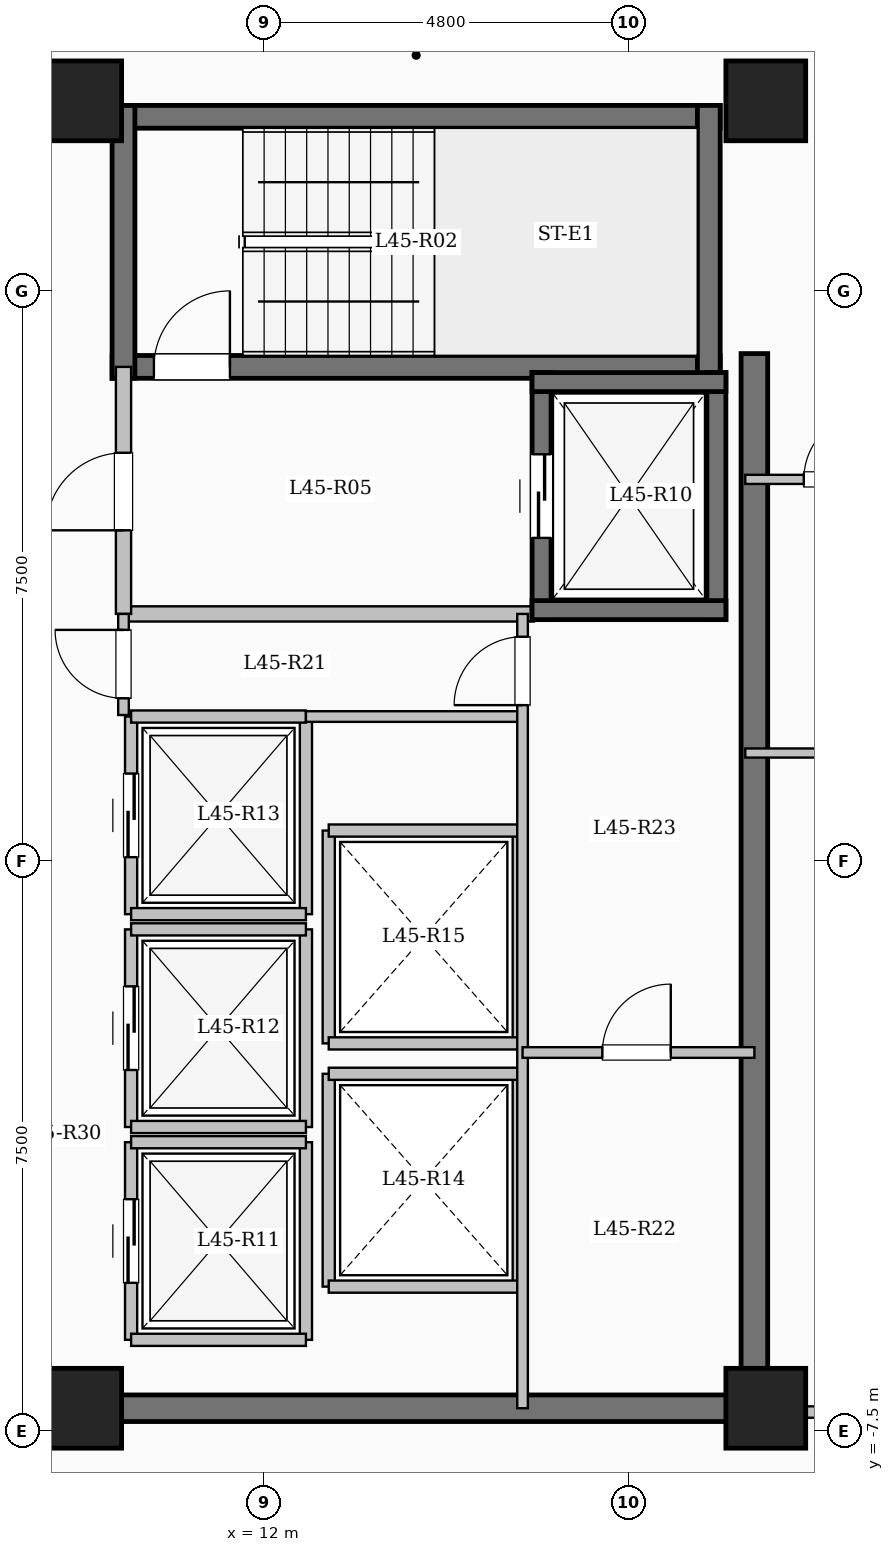
"""IFC4 building model, lengths in metres.
Left out: names, types, materials, properties, quantities, classifications, styles, units other than length and angle.
Written with IfcOpenShell. Run it as: python <this file> out.ifc"""

import sys

from ifc_helpers import new_model, si_unit, direction, frame, frame_2d, origin, origin_2d, place, context, subcontext, project, spatial, rectangle, extrude, element, fill, save


model = new_model("IFC4")
c1 = context("Model", 3, precision=1e-05, world=origin(), true_north=direction((0.0, 1.0)))
c2 = subcontext(c1, "Body", "Model", "MODEL_VIEW")
j1 = project(units=[si_unit("LENGTHUNIT", "METRE"), si_unit("PLANEANGLEUNIT", "RADIAN")], contexts=[c1])
p1 = place(None, origin())
s1 = spatial("IfcSite", under=j1, at=p1, CompositionType="ELEMENT")
p2 = place(p1, origin())
s2 = spatial("IfcBuilding", under=s1, at=p2, CompositionType="ELEMENT")
p3 = place(p2, frame((0.0, 0.0, 166.1)))
s3 = spatial("IfcBuildingStorey", under=s2, at=p3, CompositionType="ELEMENT", Elevation=166.1)
for number, where, z_axis, x_axis in (
    (1, (9.6, -7.2, 0.0), (0.0, 0.0, 1.0), (1.0, 0.0, 0.0)),
    (2, (9.6, 10.0, 0.0), (0.0, 0.0, 1.0), (1.0, 0.0, 0.0)),
    (3, (18.6, -7.2, 0.0), (0.0, 0.0, 1.0), (1.0, 0.0, 0.0)),
    (4, (18.6, 10.0, 0.0), (0.0, 0.0, 1.0), (1.0, 0.0, 0.0)),
):
    element("IfcColumn", number, at=place(p3, frame(where, z_axis=z_axis, x_axis=x_axis)), inside=s3, PredefinedType="COLUMN", context=c2, shape_type="SweptSolid", body=[
        extrude(rectangle(XDim=1.05, YDim=1.05, at=origin_2d()), origin(), (0.0, 0.0, 1.0), 3.35),
    ])
p4 = place(p3, frame((10.0, 9.79, 0.0), z_axis=(0.0, 0.0, 1.0), x_axis=(1.0, 0.0, 0.0)))
e5 = element("IfcWall", 5, at=p4, inside=s3, PredefinedType="SHEAR", context=c2, shape_type="SweptSolid", body=[
    extrude(rectangle(XDim=8.0, YDim=0.3, at=frame_2d((4.0, 0.0))), origin(), (0.0, 0.0, 1.0), 3.35),
])
p5 = place(p3, frame((10.0, 6.5, 0.0), z_axis=(0.0, 0.0, 1.0), x_axis=(1.0, 0.0, 0.0)))
e6 = element("IfcWall", 6, at=p5, inside=s3, PredefinedType="SHEAR", context=c2, shape_type="SweptSolid", body=[
    extrude(rectangle(XDim=8.0, YDim=0.3, at=frame_2d((4.0, 0.0))), origin(), (0.0, 0.0, 1.0), 3.35),
])
p6 = place(p5, frame((0.55, 0.0, 0.0)))
e7 = element("IfcOpeningElement", 7, at=p6, cuts=e6, PredefinedType="OPENING", context=c2, shape_type="SweptSolid", body=[
    extrude(rectangle(XDim=1.0, YDim=2.15, at=frame_2d((0.5, 1.075))), frame((0.0, 0.16, 0.0), z_axis=(0.0, -1.0, 0.0), x_axis=(1.0, 0.0, 0.0)), (0.0, 0.0, 1.0), 0.32),
])
for number, where, z_axis, x_axis in (
    (8, (10.15, 6.35, 0.0), (0.0, 0.0, 1.0), (0.0, 1.0, 0.0)),
    (9, (17.85, 6.35, 0.0), (0.0, 0.0, 1.0), (0.0, 1.0, 0.0)),
):
    element("IfcWall", number, at=place(p3, frame(where, z_axis=z_axis, x_axis=x_axis)), inside=s3, PredefinedType="SHEAR", context=c2, shape_type="SweptSolid", body=[
        extrude(rectangle(XDim=3.59, YDim=0.3, at=frame_2d((1.795, 0.0))), origin(), (0.0, 0.0, 1.0), 3.35),
    ])
p7 = place(p3, frame((10.15, 3.25, 0.0), z_axis=(0.0, 0.0, 1.0), x_axis=(1.0, 0.0, 0.0)))
e10 = element("IfcWall", 10, at=p7, inside=s3, PredefinedType="SOLIDWALL", context=c2, shape_type="SweptSolid", body=[
    extrude(rectangle(XDim=5.4, YDim=0.2, at=frame_2d((2.7, 0.0))), origin(), (0.0, 0.0, 1.0), 3.1),
])
p8 = place(p3, frame((10.15, 3.25, 0.0), z_axis=(0.0, 0.0, 1.0), x_axis=(0.0, 1.0, 0.0)))
e11 = element("IfcWall", 11, at=p8, inside=s3, PredefinedType="SOLIDWALL", context=c2, shape_type="SweptSolid", body=[
    extrude(rectangle(XDim=3.25, YDim=0.2, at=frame_2d((1.625, 0.0))), origin(), (0.0, 0.0, 1.0), 3.1),
])
p9 = place(p8, frame((1.1, 0.0, 0.0)))
e12 = element("IfcOpeningElement", 12, at=p9, cuts=e11, PredefinedType="OPENING", context=c2, shape_type="SweptSolid", body=[
    extrude(rectangle(XDim=1.02, YDim=2.15, at=frame_2d((0.51, 1.075))), frame((0.0, 0.11, 0.0), z_axis=(0.0, -1.0, 0.0), x_axis=(1.0, 0.0, 0.0)), (0.0, 0.0, 1.0), 0.22),
])
p10 = place(p3, frame((15.65, 3.175, 0.0), z_axis=(0.0, 0.0, 1.0), x_axis=(0.0, 1.0, 0.0)))
e13 = element("IfcWall", 13, at=p10, inside=s3, PredefinedType="SHEAR", context=c2, shape_type="SweptSolid", body=[
    extrude(rectangle(XDim=3.25, YDim=0.25, at=frame_2d((1.625, 0.0))), origin(), (0.0, 0.0, 1.0), 3.35),
])
p11 = place(p10, frame((1.075, 0.0, 0.0)))
e14 = element("IfcOpeningElement", 14, at=p11, cuts=e13, PredefinedType="OPENING", context=c2, shape_type="SweptSolid", body=[
    extrude(rectangle(XDim=1.1, YDim=2.15, at=frame_2d((0.55, 1.075))), frame((0.0, 0.135, 0.0), z_axis=(0.0, -1.0, 0.0), x_axis=(1.0, 0.0, 0.0)), (0.0, 0.0, 1.0), 0.27),
])
p12 = place(p3, frame((17.95, 3.175, 0.0), z_axis=(0.0, 0.0, 1.0), x_axis=(0.0, 1.0, 0.0)))
e15 = element("IfcWall", 15, at=p12, inside=s3, PredefinedType="SHEAR", context=c2, shape_type="SweptSolid", body=[
    extrude(rectangle(XDim=3.25, YDim=0.25, at=frame_2d((1.625, 0.0))), origin(), (0.0, 0.0, 1.0), 3.35),
])
for number, where, z_axis, x_axis in (
    (16, (15.525, 3.3, 0.0), (0.0, 0.0, 1.0), (1.0, 0.0, 0.0)),
    (17, (15.525, 6.3, 0.0), (0.0, 0.0, 1.0), (1.0, 0.0, 0.0)),
):
    element("IfcWall", number, at=place(p3, frame(where, z_axis=z_axis, x_axis=x_axis)), inside=s3, PredefinedType="SHEAR", context=c2, shape_type="SweptSolid", body=[
        extrude(rectangle(XDim=2.55, YDim=0.25, at=frame_2d((1.275, 0.0))), origin(), (0.0, 0.0, 1.0), 3.35),
    ])
p13 = place(p3, frame((10.25, -6.3, 0.0), z_axis=(0.0, 0.0, 1.0), x_axis=(0.0, 1.0, 0.0)))
e18 = element("IfcWall", 18, at=p13, inside=s3, PredefinedType="SOLIDWALL", context=c2, shape_type="SweptSolid", body=[
    extrude(rectangle(XDim=2.6, YDim=0.16, at=frame_2d((1.3, 0.0))), origin(), (0.0, 0.0, 1.0), 3.1),
])
p14 = place(p13, frame((0.75, 0.0, 0.0)))
e19 = element("IfcOpeningElement", 19, at=p14, cuts=e18, PredefinedType="OPENING", context=c2, shape_type="SweptSolid", body=[
    extrude(rectangle(XDim=1.1, YDim=2.15, at=frame_2d((0.55, 1.075))), frame((0.0, 0.09, 0.0), z_axis=(0.0, -1.0, 0.0), x_axis=(1.0, 0.0, 0.0)), (0.0, 0.0, 1.0), 0.18),
])
p15 = place(p3, frame((12.55, -6.3, 0.0), z_axis=(0.0, 0.0, 1.0), x_axis=(0.0, 1.0, 0.0)))
e20 = element("IfcWall", 20, at=p15, inside=s3, PredefinedType="SOLIDWALL", context=c2, shape_type="SweptSolid", body=[
    extrude(rectangle(XDim=2.6, YDim=0.16, at=frame_2d((1.3, 0.0))), origin(), (0.0, 0.0, 1.0), 3.1),
])
for number, where, z_axis, x_axis in (
    (21, (10.25, -6.3, 0.0), (0.0, 0.0, 1.0), (1.0, 0.0, 0.0)),
    (22, (10.25, -3.7, 0.0), (0.0, 0.0, 1.0), (1.0, 0.0, 0.0)),
):
    element("IfcWall", number, at=place(p3, frame(where, z_axis=z_axis, x_axis=x_axis)), inside=s3, PredefinedType="SOLIDWALL", context=c2, shape_type="SweptSolid", body=[
        extrude(rectangle(XDim=2.3, YDim=0.16, at=frame_2d((1.15, 0.0))), origin(), (0.0, 0.0, 1.0), 3.1),
    ])
p16 = place(p3, frame((10.25, -3.5, 0.0), z_axis=(0.0, 0.0, 1.0), x_axis=(0.0, 1.0, 0.0)))
e23 = element("IfcWall", 23, at=p16, inside=s3, PredefinedType="SOLIDWALL", context=c2, shape_type="SweptSolid", body=[
    extrude(rectangle(XDim=2.6, YDim=0.16, at=frame_2d((1.3, 0.0))), origin(), (0.0, 0.0, 1.0), 3.1),
])
p17 = place(p16, frame((0.75, 0.0, 0.0)))
e24 = element("IfcOpeningElement", 24, at=p17, cuts=e23, PredefinedType="OPENING", context=c2, shape_type="SweptSolid", body=[
    extrude(rectangle(XDim=1.1, YDim=2.15, at=frame_2d((0.55, 1.075))), frame((0.0, 0.09, 0.0), z_axis=(0.0, -1.0, 0.0), x_axis=(1.0, 0.0, 0.0)), (0.0, 0.0, 1.0), 0.18),
])
p18 = place(p3, frame((12.55, -3.5, 0.0), z_axis=(0.0, 0.0, 1.0), x_axis=(0.0, 1.0, 0.0)))
e25 = element("IfcWall", 25, at=p18, inside=s3, PredefinedType="SOLIDWALL", context=c2, shape_type="SweptSolid", body=[
    extrude(rectangle(XDim=2.6, YDim=0.16, at=frame_2d((1.3, 0.0))), origin(), (0.0, 0.0, 1.0), 3.1),
])
for number, where, z_axis, x_axis in (
    (26, (10.25, -3.5, 0.0), (0.0, 0.0, 1.0), (1.0, 0.0, 0.0)),
    (27, (10.25, -0.9, 0.0), (0.0, 0.0, 1.0), (1.0, 0.0, 0.0)),
):
    element("IfcWall", number, at=place(p3, frame(where, z_axis=z_axis, x_axis=x_axis)), inside=s3, PredefinedType="SOLIDWALL", context=c2, shape_type="SweptSolid", body=[
        extrude(rectangle(XDim=2.3, YDim=0.16, at=frame_2d((1.15, 0.0))), origin(), (0.0, 0.0, 1.0), 3.1),
    ])
p19 = place(p3, frame((10.25, -0.7, 0.0), z_axis=(0.0, 0.0, 1.0), x_axis=(0.0, 1.0, 0.0)))
e28 = element("IfcWall", 28, at=p19, inside=s3, PredefinedType="SOLIDWALL", context=c2, shape_type="SweptSolid", body=[
    extrude(rectangle(XDim=2.6, YDim=0.16, at=frame_2d((1.3, 0.0))), origin(), (0.0, 0.0, 1.0), 3.1),
])
p20 = place(p19, frame((0.75, 0.0, 0.0)))
e29 = element("IfcOpeningElement", 29, at=p20, cuts=e28, PredefinedType="OPENING", context=c2, shape_type="SweptSolid", body=[
    extrude(rectangle(XDim=1.1, YDim=2.15, at=frame_2d((0.55, 1.075))), frame((0.0, 0.09, 0.0), z_axis=(0.0, -1.0, 0.0), x_axis=(1.0, 0.0, 0.0)), (0.0, 0.0, 1.0), 0.18),
])
p21 = place(p3, frame((12.55, -0.7, 0.0), z_axis=(0.0, 0.0, 1.0), x_axis=(0.0, 1.0, 0.0)))
e30 = element("IfcWall", 30, at=p21, inside=s3, PredefinedType="SOLIDWALL", context=c2, shape_type="SweptSolid", body=[
    extrude(rectangle(XDim=2.6, YDim=0.16, at=frame_2d((1.3, 0.0))), origin(), (0.0, 0.0, 1.0), 3.1),
])
for number, where, z_axis, x_axis in (
    (31, (10.25, -0.7, 0.0), (0.0, 0.0, 1.0), (1.0, 0.0, 0.0)),
    (32, (10.25, 1.9, 0.0), (0.0, 0.0, 1.0), (1.0, 0.0, 0.0)),
):
    element("IfcWall", number, at=place(p3, frame(where, z_axis=z_axis, x_axis=x_axis)), inside=s3, PredefinedType="SOLIDWALL", context=c2, shape_type="SweptSolid", body=[
        extrude(rectangle(XDim=2.3, YDim=0.16, at=frame_2d((1.15, 0.0))), origin(), (0.0, 0.0, 1.0), 3.1),
    ])
for number, where, z_axis, x_axis in (
    (33, (12.85, -5.6, 0.0), (0.0, 0.0, 1.0), (0.0, 1.0, 0.0)),
    (34, (15.35, -5.6, 0.0), (0.0, 0.0, 1.0), (0.0, 1.0, 0.0)),
):
    element("IfcWall", number, at=place(p3, frame(where, z_axis=z_axis, x_axis=x_axis)), inside=s3, PredefinedType="SOLIDWALL", context=c2, shape_type="SweptSolid", body=[
        extrude(rectangle(XDim=2.8, YDim=0.16, at=frame_2d((1.4, 0.0))), origin(), (0.0, 0.0, 1.0), 3.1),
    ])
for number, where, z_axis, x_axis in (
    (35, (12.85, -5.6, 0.0), (0.0, 0.0, 1.0), (1.0, 0.0, 0.0)),
    (36, (12.85, -2.8, 0.0), (0.0, 0.0, 1.0), (1.0, 0.0, 0.0)),
):
    element("IfcWall", number, at=place(p3, frame(where, z_axis=z_axis, x_axis=x_axis)), inside=s3, PredefinedType="SOLIDWALL", context=c2, shape_type="SweptSolid", body=[
        extrude(rectangle(XDim=2.5, YDim=0.16, at=frame_2d((1.25, 0.0))), origin(), (0.0, 0.0, 1.0), 3.1),
    ])
for number, where, z_axis, x_axis in (
    (37, (12.85, -2.4, 0.0), (0.0, 0.0, 1.0), (0.0, 1.0, 0.0)),
    (38, (15.35, -2.4, 0.0), (0.0, 0.0, 1.0), (0.0, 1.0, 0.0)),
):
    element("IfcWall", number, at=place(p3, frame(where, z_axis=z_axis, x_axis=x_axis)), inside=s3, PredefinedType="SOLIDWALL", context=c2, shape_type="SweptSolid", body=[
        extrude(rectangle(XDim=2.8, YDim=0.16, at=frame_2d((1.4, 0.0))), origin(), (0.0, 0.0, 1.0), 3.1),
    ])
for number, where, z_axis, x_axis in (
    (39, (12.85, -2.4, 0.0), (0.0, 0.0, 1.0), (1.0, 0.0, 0.0)),
    (40, (12.85, 0.4, 0.0), (0.0, 0.0, 1.0), (1.0, 0.0, 0.0)),
):
    element("IfcWall", number, at=place(p3, frame(where, z_axis=z_axis, x_axis=x_axis)), inside=s3, PredefinedType="SOLIDWALL", context=c2, shape_type="SweptSolid", body=[
        extrude(rectangle(XDim=2.5, YDim=0.16, at=frame_2d((1.25, 0.0))), origin(), (0.0, 0.0, 1.0), 3.1),
    ])
p22 = place(p3, frame((18.45, -7.375, 0.0), z_axis=(0.0, 0.0, 1.0), x_axis=(0.0, 1.0, 0.0)))
e41 = element("IfcWall", 41, at=p22, inside=s3, PredefinedType="SHEAR", context=c2, shape_type="SweptSolid", body=[
    extrude(rectangle(XDim=14.05, YDim=0.35, at=frame_2d((7.025, 0.0))), origin(), (0.0, 0.0, 1.0), 3.35),
])
p23 = place(p3, frame((10.075, -7.2, 0.0), z_axis=(0.0, 0.0, 1.0), x_axis=(1.0, 0.0, 0.0)))
e42 = element("IfcWall", 42, at=p23, inside=s3, PredefinedType="SHEAR", context=c2, shape_type="SweptSolid", body=[
    extrude(rectangle(XDim=8.55, YDim=0.35, at=frame_2d((4.275, 0.0))), origin(), (0.0, 0.0, 1.0), 3.35),
])
p24 = place(p3, frame((12.55, 1.9, 0.0), z_axis=(0.0, 0.0, 1.0), x_axis=(1.0, 0.0, 0.0)))
e43 = element("IfcWall", 43, at=p24, inside=s3, PredefinedType="PARTITIONING", context=c2, shape_type="SweptSolid", body=[
    extrude(rectangle(XDim=2.85, YDim=0.14, at=frame_2d((1.425, 0.0))), origin(), (0.0, 0.0, 1.0), 3.1),
])
p25 = place(p3, frame((10.15, 1.92, 0.0), z_axis=(0.0, 0.0, 1.0), x_axis=(0.0, 1.0, 0.0)))
e44 = element("IfcWall", 44, at=p25, inside=s3, PredefinedType="PARTITIONING", context=c2, shape_type="SweptSolid", body=[
    extrude(rectangle(XDim=1.33, YDim=0.14, at=frame_2d((0.665, 0.0))), origin(), (0.0, 0.0, 1.0), 3.1),
])
p26 = place(p25, frame((0.22, 0.0, 0.0)))
e45 = element("IfcOpeningElement", 45, at=p26, cuts=e44, PredefinedType="OPENING", context=c2, shape_type="SweptSolid", body=[
    extrude(rectangle(XDim=0.9, YDim=2.08, at=frame_2d((0.45, 1.04))), frame((0.0, 0.08, 0.0), z_axis=(0.0, -1.0, 0.0), x_axis=(1.0, 0.0, 0.0)), (0.0, 0.0, 1.0), 0.16),
])
p27 = place(p3, frame((15.4, -7.2, 0.0), z_axis=(0.0, 0.0, 1.0), x_axis=(0.0, 1.0, 0.0)))
e46 = element("IfcWall", 46, at=p27, inside=s3, PredefinedType="PARTITIONING", context=c2, shape_type="SweptSolid", body=[
    extrude(rectangle(XDim=10.45, YDim=0.14, at=frame_2d((5.225, 0.0))), origin(), (0.0, 0.0, 1.0), 3.1),
])
p28 = place(p27, frame((9.25, 0.0, 0.0)))
e47 = element("IfcOpeningElement", 47, at=p28, cuts=e46, PredefinedType="OPENING", context=c2, shape_type="SweptSolid", body=[
    extrude(rectangle(XDim=0.9, YDim=2.08, at=frame_2d((0.45, 1.04))), frame((0.0, 0.08, 0.0), z_axis=(0.0, -1.0, 0.0), x_axis=(1.0, 0.0, 0.0)), (0.0, 0.0, 1.0), 0.16),
])
p29 = place(p3, frame((15.4, -2.52, 0.0), z_axis=(0.0, 0.0, 1.0), x_axis=(1.0, 0.0, 0.0)))
e48 = element("IfcWall", 48, at=p29, inside=s3, PredefinedType="PARTITIONING", context=c2, shape_type="SweptSolid", body=[
    extrude(rectangle(XDim=3.05, YDim=0.14, at=frame_2d((1.525, 0.0))), origin(), (0.0, 0.0, 1.0), 3.1),
])
p30 = place(p29, frame((1.05, 0.0, 0.0)))
e49 = element("IfcOpeningElement", 49, at=p30, cuts=e48, PredefinedType="OPENING", context=c2, shape_type="SweptSolid", body=[
    extrude(rectangle(XDim=0.9, YDim=2.08, at=frame_2d((0.45, 1.04))), frame((0.0, 0.08, 0.0), z_axis=(0.0, -1.0, 0.0), x_axis=(1.0, 0.0, 0.0)), (0.0, 0.0, 1.0), 0.16),
])
p31 = place(p3, frame((18.45, -7.25, 0.0), z_axis=(0.0, 0.0, 1.0), x_axis=(1.0, 0.0, 0.0)))
e50 = element("IfcWall", 50, at=p31, inside=s3, PredefinedType="PARTITIONING", context=c2, shape_type="SweptSolid", body=[
    extrude(rectangle(XDim=6.63, YDim=0.15, at=frame_2d((3.315, 0.0))), origin(), (0.0, 0.0, 1.0), 3.1),
])
p32 = place(p31, frame((1.95, 0.0, 0.0)))
e51 = element("IfcOpeningElement", 51, at=p32, cuts=e50, PredefinedType="OPENING", context=c2, shape_type="SweptSolid", body=[
    extrude(rectangle(XDim=0.96, YDim=2.15, at=frame_2d((0.48, 1.075))), frame((0.0, 0.085, 0.0), z_axis=(0.0, -1.0, 0.0), x_axis=(1.0, 0.0, 0.0)), (0.0, 0.0, 1.0), 0.17),
])
p33 = place(p3, frame((18.33, 1.42, 0.0), z_axis=(0.0, 0.0, 1.0), x_axis=(1.0, 0.0, 0.0)))
e52 = element("IfcWall", 52, at=p33, inside=s3, PredefinedType="PARTITIONING", context=c2, shape_type="SweptSolid", body=[
    extrude(rectangle(XDim=6.87, YDim=0.12, at=frame_2d((3.435, 0.0))), origin(), (0.0, 0.0, 1.0), 3.1),
])
p34 = place(p33, frame((1.413, 0.0, 0.0)))
e53 = element("IfcOpeningElement", 53, at=p34, cuts=e52, PredefinedType="OPENING", context=c2, shape_type="SweptSolid", body=[
    extrude(rectangle(XDim=0.88, YDim=2.1, at=frame_2d((0.44, 1.05))), frame((0.0, 0.07, 0.0), z_axis=(0.0, -1.0, 0.0), x_axis=(1.0, 0.0, 0.0)), (0.0, 0.0, 1.0), 0.14),
])
p35 = place(p33, frame((4.678, 0.0, 0.0)))
e54 = element("IfcOpeningElement", 54, at=p35, cuts=e52, PredefinedType="OPENING", context=c2, shape_type="SweptSolid", body=[
    extrude(rectangle(XDim=0.88, YDim=2.1, at=frame_2d((0.44, 1.05))), frame((0.0, 0.07, 0.0), z_axis=(0.0, -1.0, 0.0), x_axis=(1.0, 0.0, 0.0)), (0.0, 0.0, 1.0), 0.14),
])
p36 = place(p3, frame((18.33, 5.02, 0.0), z_axis=(0.0, 0.0, 1.0), x_axis=(1.0, 0.0, 0.0)))
e55 = element("IfcWall", 55, at=p36, inside=s3, PredefinedType="PARTITIONING", context=c2, shape_type="SweptSolid", body=[
    extrude(rectangle(XDim=6.87, YDim=0.12, at=frame_2d((3.435, 0.0))), origin(), (0.0, 0.0, 1.0), 3.1),
])
p37 = place(p36, frame((0.77, 0.0, 0.0)))
e56 = element("IfcOpeningElement", 56, at=p37, cuts=e55, PredefinedType="OPENING", context=c2, shape_type="SweptSolid", body=[
    extrude(rectangle(XDim=0.88, YDim=2.1, at=frame_2d((0.44, 1.05))), frame((0.0, 0.07, 0.0), z_axis=(0.0, -1.0, 0.0), x_axis=(1.0, 0.0, 0.0)), (0.0, 0.0, 1.0), 0.14),
])
p38 = place(p6, origin())
e57 = element("IfcDoor", 57, at=p38, inside=s3, OperationType="SINGLE_SWING_RIGHT", PredefinedType="DOOR", context=c2, shape_type="SweptSolid", body=[
    extrude(rectangle(XDim=1.0, YDim=2.15, at=frame_2d((0.5, 1.075))), frame((0.0, 0.025, 0.0), z_axis=(0.0, -1.0, 0.0), x_axis=(1.0, 0.0, 0.0)), (0.0, 0.0, 1.0), 0.05),
])
fill(e7, e57)
p39 = place(p9, origin())
e58 = element("IfcDoor", 58, at=p39, inside=s3, OperationType="SINGLE_SWING_LEFT", PredefinedType="DOOR", context=c2, shape_type="SweptSolid", body=[
    extrude(rectangle(XDim=1.02, YDim=2.15, at=frame_2d((0.51, 1.075))), frame((0.0, 0.025, 0.0), z_axis=(0.0, -1.0, 0.0), x_axis=(1.0, 0.0, 0.0)), (0.0, 0.0, 1.0), 0.05),
])
fill(e12, e58)
p40 = place(p11, origin())
e59 = element("IfcDoor", 59, at=p40, inside=s3, OperationType="SLIDING_TO_LEFT", PredefinedType="DOOR", context=c2, shape_type="SweptSolid", body=[
    extrude(rectangle(XDim=1.1, YDim=2.15, at=frame_2d((0.55, 1.075))), frame((0.0, 0.025, 0.0), z_axis=(0.0, -1.0, 0.0), x_axis=(1.0, 0.0, 0.0)), (0.0, 0.0, 1.0), 0.05),
])
fill(e14, e59)
p41 = place(p14, origin())
e60 = element("IfcDoor", 60, at=p41, inside=s3, OperationType="SLIDING_TO_LEFT", PredefinedType="DOOR", context=c2, shape_type="SweptSolid", body=[
    extrude(rectangle(XDim=1.1, YDim=2.15, at=frame_2d((0.55, 1.075))), frame((0.0, 0.025, 0.0), z_axis=(0.0, -1.0, 0.0), x_axis=(1.0, 0.0, 0.0)), (0.0, 0.0, 1.0), 0.05),
])
fill(e19, e60)
p42 = place(p17, origin())
e61 = element("IfcDoor", 61, at=p42, inside=s3, OperationType="SLIDING_TO_LEFT", PredefinedType="DOOR", context=c2, shape_type="SweptSolid", body=[
    extrude(rectangle(XDim=1.1, YDim=2.15, at=frame_2d((0.55, 1.075))), frame((0.0, 0.025, 0.0), z_axis=(0.0, -1.0, 0.0), x_axis=(1.0, 0.0, 0.0)), (0.0, 0.0, 1.0), 0.05),
])
fill(e24, e61)
p43 = place(p20, origin())
e62 = element("IfcDoor", 62, at=p43, inside=s3, OperationType="SLIDING_TO_LEFT", PredefinedType="DOOR", context=c2, shape_type="SweptSolid", body=[
    extrude(rectangle(XDim=1.1, YDim=2.15, at=frame_2d((0.55, 1.075))), frame((0.0, 0.025, 0.0), z_axis=(0.0, -1.0, 0.0), x_axis=(1.0, 0.0, 0.0)), (0.0, 0.0, 1.0), 0.05),
])
fill(e29, e62)
p44 = place(p26, origin())
e63 = element("IfcDoor", 63, at=p44, inside=s3, OperationType="SINGLE_SWING_RIGHT", PredefinedType="DOOR", context=c2, shape_type="SweptSolid", body=[
    extrude(rectangle(XDim=0.9, YDim=2.08, at=frame_2d((0.45, 1.04))), frame((0.0, 0.025, 0.0), z_axis=(0.0, -1.0, 0.0), x_axis=(1.0, 0.0, 0.0)), (0.0, 0.0, 1.0), 0.05),
])
fill(e45, e63)
p45 = place(p28, origin())
e64 = element("IfcDoor", 64, at=p45, inside=s3, OperationType="SINGLE_SWING_LEFT", PredefinedType="DOOR", context=c2, shape_type="SweptSolid", body=[
    extrude(rectangle(XDim=0.9, YDim=2.08, at=frame_2d((0.45, 1.04))), frame((0.0, 0.025, 0.0), z_axis=(0.0, -1.0, 0.0), x_axis=(1.0, 0.0, 0.0)), (0.0, 0.0, 1.0), 0.05),
])
fill(e47, e64)
p46 = place(p30, origin())
e65 = element("IfcDoor", 65, at=p46, inside=s3, OperationType="SINGLE_SWING_RIGHT", PredefinedType="DOOR", context=c2, shape_type="SweptSolid", body=[
    extrude(rectangle(XDim=0.9, YDim=2.08, at=frame_2d((0.45, 1.04))), frame((0.0, 0.025, 0.0), z_axis=(0.0, -1.0, 0.0), x_axis=(1.0, 0.0, 0.0)), (0.0, 0.0, 1.0), 0.05),
])
fill(e49, e65)
p47 = place(p37, origin())
e66 = element("IfcDoor", 66, at=p47, inside=s3, OperationType="SINGLE_SWING_RIGHT", PredefinedType="DOOR", context=c2, shape_type="SweptSolid", body=[
    extrude(rectangle(XDim=0.88, YDim=2.1, at=frame_2d((0.44, 1.05))), frame((0.0, 0.025, 0.0), z_axis=(0.0, -1.0, 0.0), x_axis=(1.0, 0.0, 0.0)), (0.0, 0.0, 1.0), 0.05),
])
fill(e56, e66)
save(model, sys.argv[1])
